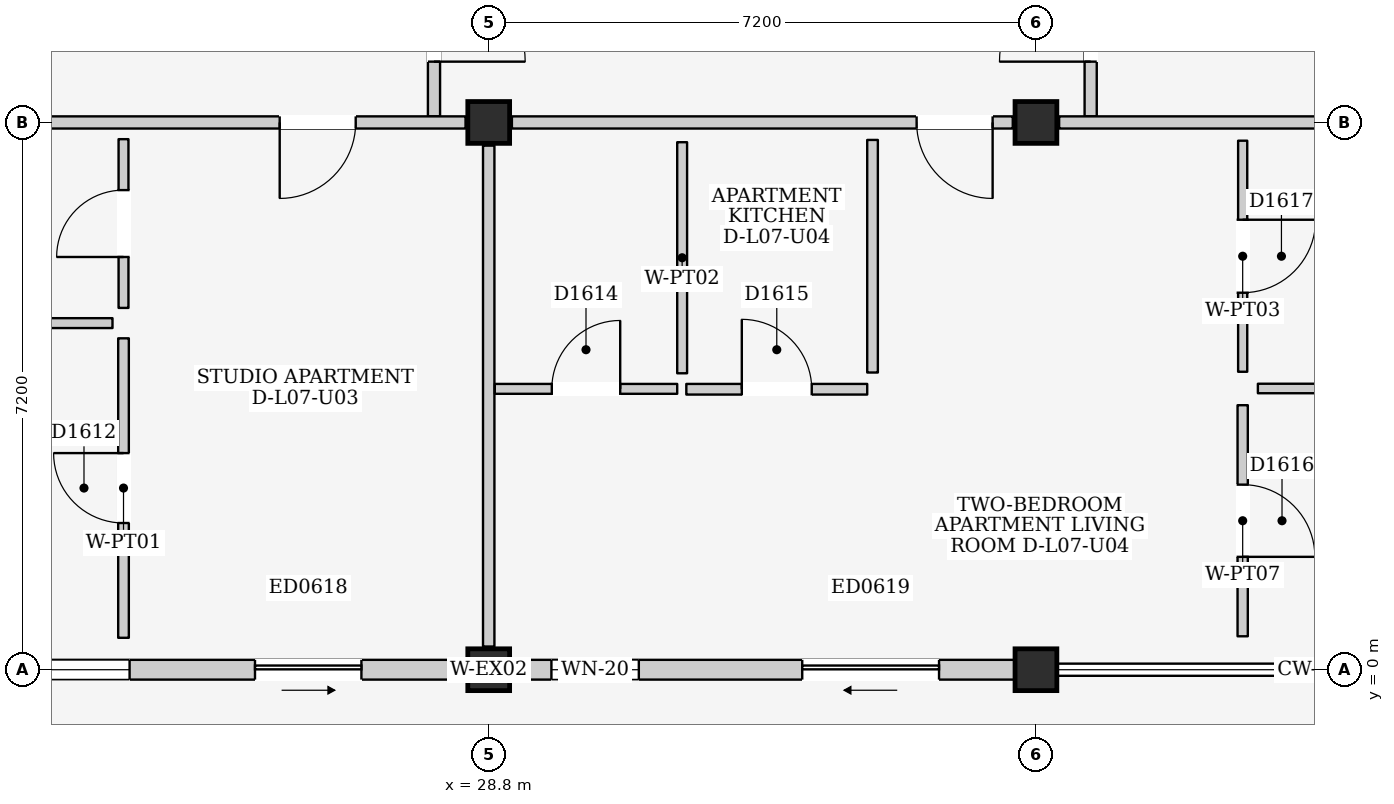
"""IFC4 building model, lengths in metres.
Left out: names, types, materials, properties, quantities, classifications, styles, units other than length and angle.
Written with IfcOpenShell. Run it as: python <this file> out.ifc"""

import sys

from ifc_helpers import new_model, si_unit, direction, frame, frame_2d, origin, origin_2d, place, context, subcontext, project, spatial, rectangle, extrude, element, fill, save


model = new_model("IFC4")
c1 = context("Model", 3, precision=1e-05, world=origin(), true_north=direction((0.0, 1.0)))
c2 = subcontext(c1, "Body", "Model", "MODEL_VIEW")
j1 = project(units=[si_unit("LENGTHUNIT", "METRE"), si_unit("PLANEANGLEUNIT", "RADIAN")], contexts=[c1])
p1 = place(None, origin())
s1 = spatial("IfcSite", under=j1, at=p1, CompositionType="ELEMENT")
p2 = place(p1, origin())
s2 = spatial("IfcBuilding", under=s1, at=p2, CompositionType="ELEMENT")
p3 = place(p2, frame((0.0, 0.0, 25.1)))
s3 = spatial("IfcBuildingStorey", under=s2, at=p3, CompositionType="ELEMENT", Elevation=25.1)
for number, where, z_axis, x_axis in (
    (1, (28.8, 0.0, 0.0), (0.0, 0.0, 1.0), (1.0, 0.0, 0.0)),
    (2, (28.8, 7.2, 0.0), (0.0, 0.0, 1.0), (1.0, 0.0, 0.0)),
    (3, (36.0, 0.0, 0.0), (0.0, 0.0, 1.0), (1.0, 0.0, 0.0)),
    (4, (36.0, 7.2, 0.0), (0.0, 0.0, 1.0), (1.0, 0.0, 0.0)),
):
    element("IfcColumn", number, at=place(p3, frame(where, z_axis=z_axis, x_axis=x_axis)), inside=s3, PredefinedType="COLUMN", context=c2, shape_type="SweptSolid", body=[
        extrude(rectangle(XDim=0.55, YDim=0.55, at=origin_2d()), origin(), (0.0, 0.0, 1.0), 3.2),
    ])
p4 = place(p3, frame((21.875, 0.0, 0.0), z_axis=(0.0, 0.0, 1.0), x_axis=(1.0, 0.0, 0.0)))
e5 = element("IfcWall", 5, at=p4, inside=s3, PredefinedType="ELEMENTEDWALL", context=c2, shape_type="SweptSolid", body=[
    extrude(rectangle(XDim=6.65, YDim=0.26, at=frame_2d((3.325, 0.0))), origin(), (0.0, 0.0, 1.0), 2.525),
])
p5 = place(p4, frame((3.85, 0.0, 0.0)))
e6 = element("IfcOpeningElement", 6, at=p5, cuts=e5, PredefinedType="OPENING", context=c2, shape_type="SweptSolid", body=[
    extrude(rectangle(XDim=1.4, YDim=2.1, at=frame_2d((0.7, 1.05))), frame((0.0, 0.145, 0.0), z_axis=(0.0, -1.0, 0.0), x_axis=(1.0, 0.0, 0.0)), (0.0, 0.0, 1.0), 0.29),
])
p6 = place(p4, frame((0.55, 0.0, 0.9)))
e7 = element("IfcOpeningElement", 7, at=p6, cuts=e5, PredefinedType="OPENING", context=c2, shape_type="SweptSolid", body=[
    extrude(rectangle(XDim=1.65, YDim=1.35, at=frame_2d((0.825, 0.675))), frame((0.0, 0.145, 0.0), z_axis=(0.0, -1.0, 0.0), x_axis=(1.0, 0.0, 0.0)), (0.0, 0.0, 1.0), 0.29),
])
p7 = place(p3, frame((29.075, 0.0, 0.0), z_axis=(0.0, 0.0, 1.0), x_axis=(1.0, 0.0, 0.0)))
e8 = element("IfcWall", 8, at=p7, inside=s3, PredefinedType="ELEMENTEDWALL", context=c2, shape_type="SweptSolid", body=[
    extrude(rectangle(XDim=6.65, YDim=0.26, at=frame_2d((3.325, 0.0))), origin(), (0.0, 0.0, 1.0), 2.525),
])
p8 = place(p7, frame((3.85, 0.0, 0.0)))
e9 = element("IfcOpeningElement", 9, at=p8, cuts=e8, PredefinedType="OPENING", context=c2, shape_type="SweptSolid", body=[
    extrude(rectangle(XDim=1.8, YDim=2.12, at=frame_2d((0.9, 1.06))), frame((0.0, 0.145, 0.0), z_axis=(0.0, -1.0, 0.0), x_axis=(1.0, 0.0, 0.0)), (0.0, 0.0, 1.0), 0.29),
])
p9 = place(p7, frame((0.55, 0.0, 0.9)))
e10 = element("IfcOpeningElement", 10, at=p9, cuts=e8, PredefinedType="OPENING", context=c2, shape_type="SweptSolid", body=[
    extrude(rectangle(XDim=1.15, YDim=1.15, at=frame_2d((0.575, 0.575))), frame((0.0, 0.145, 0.0), z_axis=(0.0, -1.0, 0.0), x_axis=(1.0, 0.0, 0.0)), (0.0, 0.0, 1.0), 0.29),
])
p10 = place(p3, frame((28.08, 7.28, 0.0), z_axis=(0.0, 0.0, 1.0), x_axis=(0.0, 1.0, 0.0)))
e11 = element("IfcWall", 11, at=p10, inside=s3, PredefinedType="PARTITIONING", context=c2, shape_type="SweptSolid", body=[
    extrude(rectangle(XDim=4.32, YDim=0.16, at=frame_2d((2.16, 0.0))), origin(), (0.0, 0.0, 1.0), 2.99),
])
p11 = place(p10, frame((0.72, 0.0, 0.0)))
e12 = element("IfcOpeningElement", 12, at=p11, cuts=e11, PredefinedType="OPENING", context=c2, shape_type="SweptSolid", body=[
    extrude(rectangle(XDim=1.2, YDim=2.2, at=frame_2d((0.6, 1.1))), frame((0.0, 0.095, 0.0), z_axis=(0.0, -1.0, 0.0), x_axis=(1.0, 0.0, 0.0)), (0.0, 0.0, 1.0), 0.19),
])
p12 = place(p3, frame((36.72, 7.28, 0.0), z_axis=(0.0, 0.0, 1.0), x_axis=(0.0, 1.0, 0.0)))
e13 = element("IfcWall", 13, at=p12, inside=s3, PredefinedType="PARTITIONING", context=c2, shape_type="SweptSolid", body=[
    extrude(rectangle(XDim=4.32, YDim=0.16, at=frame_2d((2.16, 0.0))), origin(), (0.0, 0.0, 1.0), 2.99),
])
p13 = place(p12, frame((0.72, 0.0, 0.0)))
e14 = element("IfcOpeningElement", 14, at=p13, cuts=e13, PredefinedType="OPENING", context=c2, shape_type="SweptSolid", body=[
    extrude(rectangle(XDim=1.2, YDim=2.2, at=frame_2d((0.6, 1.1))), frame((0.0, 0.095, 0.0), z_axis=(0.0, -1.0, 0.0), x_axis=(1.0, 0.0, 0.0)), (0.0, 0.0, 1.0), 0.19),
])
p14 = place(p3, frame((21.905, 7.2, 0.0), z_axis=(0.0, 0.0, 1.0), x_axis=(1.0, 0.0, 0.0)))
e15 = element("IfcWall", 15, at=p14, inside=s3, PredefinedType="PARTITIONING", context=c2, shape_type="SweptSolid", body=[
    extrude(rectangle(XDim=6.59, YDim=0.16, at=frame_2d((3.295, 0.0))), origin(), (0.0, 0.0, 1.0), 2.375),
])
p15 = place(p14, frame((4.145, 0.0, 0.0)))
e16 = element("IfcOpeningElement", 16, at=p15, cuts=e15, PredefinedType="OPENING", context=c2, shape_type="SweptSolid", body=[
    extrude(rectangle(XDim=1.0, YDim=2.15, at=frame_2d((0.5, 1.075))), frame((0.0, 0.095, 0.0), z_axis=(0.0, -1.0, 0.0), x_axis=(1.0, 0.0, 0.0)), (0.0, 0.0, 1.0), 0.19),
])
p16 = place(p3, frame((28.8, 0.305, 0.0), z_axis=(0.0, 0.0, 1.0), x_axis=(0.0, 1.0, 0.0)))
e17 = element("IfcWall", 17, at=p16, inside=s3, PredefinedType="PARTITIONING", context=c2, shape_type="SweptSolid", body=[
    extrude(rectangle(XDim=6.59, YDim=0.15, at=frame_2d((3.295, 0.0))), origin(), (0.0, 0.0, 1.0), 2.475),
])
p17 = place(p3, frame((21.8, 4.56, 0.0), z_axis=(0.0, 0.0, 1.0), x_axis=(1.0, 0.0, 0.0)))
e18 = element("IfcWall", 18, at=p17, inside=s3, PredefinedType="PARTITIONING", context=c2, shape_type="SweptSolid", body=[
    extrude(rectangle(XDim=2.05, YDim=0.13, at=frame_2d((1.025, 0.0))), origin(), (0.0, 0.0, 1.0), 2.99),
])
p18 = place(p3, frame((23.995, 4.76, 0.0), z_axis=(0.0, 0.0, 1.0), x_axis=(0.0, 1.0, 0.0)))
e19 = element("IfcWall", 19, at=p18, inside=s3, PredefinedType="PARTITIONING", context=c2, shape_type="SweptSolid", body=[
    extrude(rectangle(XDim=2.22, YDim=0.13, at=frame_2d((1.11, 0.0))), origin(), (0.0, 0.0, 1.0), 2.99),
])
p19 = place(p18, frame((0.67, 0.0, 0.0)))
e20 = element("IfcOpeningElement", 20, at=p19, cuts=e19, PredefinedType="OPENING", context=c2, shape_type="SweptSolid", body=[
    extrude(rectangle(XDim=0.88, YDim=2.1, at=frame_2d((0.44, 1.05))), frame((0.0, 0.08, 0.0), z_axis=(0.0, -1.0, 0.0), x_axis=(1.0, 0.0, 0.0)), (0.0, 0.0, 1.0), 0.16),
])
p20 = place(p3, frame((23.995, 0.42, 0.0), z_axis=(0.0, 0.0, 1.0), x_axis=(0.0, 1.0, 0.0)))
e21 = element("IfcWall", 21, at=p20, inside=s3, PredefinedType="PARTITIONING", context=c2, shape_type="SweptSolid", body=[
    extrude(rectangle(XDim=3.94, YDim=0.14, at=frame_2d((1.97, 0.0))), origin(), (0.0, 0.0, 1.0), 2.99),
])
p21 = place(p20, frame((1.51, 0.0, 0.0)))
e22 = element("IfcOpeningElement", 22, at=p21, cuts=e21, PredefinedType="OPENING", context=c2, shape_type="SweptSolid", body=[
    extrude(rectangle(XDim=0.92, YDim=2.1, at=frame_2d((0.46, 1.05))), frame((0.0, 0.085, 0.0), z_axis=(0.0, -1.0, 0.0), x_axis=(1.0, 0.0, 0.0)), (0.0, 0.0, 1.0), 0.17),
])
p22 = place(p3, frame((29.105, 7.2, 0.0), z_axis=(0.0, 0.0, 1.0), x_axis=(1.0, 0.0, 0.0)))
e23 = element("IfcWall", 23, at=p22, inside=s3, PredefinedType="PARTITIONING", context=c2, shape_type="SweptSolid", body=[
    extrude(rectangle(XDim=6.59, YDim=0.16, at=frame_2d((3.295, 0.0))), origin(), (0.0, 0.0, 1.0), 2.375),
])
p23 = place(p22, frame((5.325, 0.0, 0.0)))
e24 = element("IfcOpeningElement", 24, at=p23, cuts=e23, PredefinedType="OPENING", context=c2, shape_type="SweptSolid", body=[
    extrude(rectangle(XDim=1.0, YDim=2.15, at=frame_2d((0.5, 1.075))), frame((0.0, 0.095, 0.0), z_axis=(0.0, -1.0, 0.0), x_axis=(1.0, 0.0, 0.0)), (0.0, 0.0, 1.0), 0.19),
])
p24 = place(p3, frame((36.305, 7.2, 0.0), z_axis=(0.0, 0.0, 1.0), x_axis=(1.0, 0.0, 0.0)))
e25 = element("IfcWall", 25, at=p24, inside=s3, PredefinedType="PARTITIONING", context=c2, shape_type="SweptSolid", body=[
    extrude(rectangle(XDim=6.59, YDim=0.16, at=frame_2d((3.295, 0.0))), origin(), (0.0, 0.0, 1.0), 2.375),
])
p25 = place(p3, frame((28.88, 3.695, 0.0), z_axis=(0.0, 0.0, 1.0), x_axis=(1.0, 0.0, 0.0)))
e26 = element("IfcWall", 26, at=p25, inside=s3, PredefinedType="PARTITIONING", context=c2, shape_type="SweptSolid", body=[
    extrude(rectangle(XDim=2.4, YDim=0.13, at=frame_2d((1.2, 0.0))), origin(), (0.0, 0.0, 1.0), 2.99),
])
p26 = place(p25, frame((0.75, 0.0, 0.0)))
e27 = element("IfcOpeningElement", 27, at=p26, cuts=e26, PredefinedType="OPENING", context=c2, shape_type="SweptSolid", body=[
    extrude(rectangle(XDim=0.9, YDim=2.1, at=frame_2d((0.45, 1.05))), frame((0.0, 0.08, 0.0), z_axis=(0.0, -1.0, 0.0), x_axis=(1.0, 0.0, 0.0)), (0.0, 0.0, 1.0), 0.16),
])
p27 = place(p3, frame((31.345, 3.9, 0.0), z_axis=(0.0, 0.0, 1.0), x_axis=(0.0, 1.0, 0.0)))
e28 = element("IfcWall", 28, at=p27, inside=s3, PredefinedType="PARTITIONING", context=c2, shape_type="SweptSolid", body=[
    extrude(rectangle(XDim=3.04, YDim=0.13, at=frame_2d((1.52, 0.0))), origin(), (0.0, 0.0, 1.0), 2.99),
])
p28 = place(p3, frame((31.4, 3.69, 0.0), z_axis=(0.0, 0.0, 1.0), x_axis=(1.0, 0.0, 0.0)))
e29 = element("IfcWall", 29, at=p28, inside=s3, PredefinedType="PARTITIONING", context=c2, shape_type="SweptSolid", body=[
    extrude(rectangle(XDim=2.38, YDim=0.14, at=frame_2d((1.19, 0.0))), origin(), (0.0, 0.0, 1.0), 2.99),
])
p29 = place(p28, frame((0.73, 0.0, 0.0)))
e30 = element("IfcOpeningElement", 30, at=p29, cuts=e29, PredefinedType="OPENING", context=c2, shape_type="SweptSolid", body=[
    extrude(rectangle(XDim=0.92, YDim=2.1, at=frame_2d((0.46, 1.05))), frame((0.0, 0.085, 0.0), z_axis=(0.0, -1.0, 0.0), x_axis=(1.0, 0.0, 0.0)), (0.0, 0.0, 1.0), 0.17),
])
p30 = place(p3, frame((33.85, 3.91, 0.0), z_axis=(0.0, 0.0, 1.0), x_axis=(0.0, 1.0, 0.0)))
e31 = element("IfcWall", 31, at=p30, inside=s3, PredefinedType="PARTITIONING", context=c2, shape_type="SweptSolid", body=[
    extrude(rectangle(XDim=3.06, YDim=0.14, at=frame_2d((1.53, 0.0))), origin(), (0.0, 0.0, 1.0), 2.99),
])
p31 = place(p3, frame((38.72, 0.44, 0.0), z_axis=(0.0, 0.0, 1.0), x_axis=(0.0, 1.0, 0.0)))
e32 = element("IfcWall", 32, at=p31, inside=s3, PredefinedType="PARTITIONING", context=c2, shape_type="SweptSolid", body=[
    extrude(rectangle(XDim=3.04, YDim=0.135, at=frame_2d((1.52, 0.0))), origin(), (0.0, 0.0, 1.0), 2.99),
])
p32 = place(p31, frame((1.045, 0.0, 0.0)))
e33 = element("IfcOpeningElement", 33, at=p32, cuts=e32, PredefinedType="OPENING", context=c2, shape_type="SweptSolid", body=[
    extrude(rectangle(XDim=0.95, YDim=2.15, at=frame_2d((0.475, 1.075))), frame((0.0, 0.083, 0.0), z_axis=(0.0, -1.0, 0.0), x_axis=(1.0, 0.0, 0.0)), (0.0, 0.0, 1.0), 0.165),
])
p33 = place(p3, frame((38.92, 3.7, 0.0), z_axis=(0.0, 0.0, 1.0), x_axis=(1.0, 0.0, 0.0)))
e34 = element("IfcWall", 34, at=p33, inside=s3, PredefinedType="PARTITIONING", context=c2, shape_type="SweptSolid", body=[
    extrude(rectangle(XDim=4.06, YDim=0.125, at=frame_2d((2.03, 0.0))), origin(), (0.0, 0.0, 1.0), 2.99),
])
p34 = place(p3, frame((38.72, 3.92, 0.0), z_axis=(0.0, 0.0, 1.0), x_axis=(0.0, 1.0, 0.0)))
e35 = element("IfcWall", 35, at=p34, inside=s3, PredefinedType="PARTITIONING", context=c2, shape_type="SweptSolid", body=[
    extrude(rectangle(XDim=3.04, YDim=0.12, at=frame_2d((1.52, 0.0))), origin(), (0.0, 0.0, 1.0), 2.99),
])
p35 = place(p34, frame((1.04, 0.0, 0.0)))
e36 = element("IfcOpeningElement", 36, at=p35, cuts=e35, PredefinedType="OPENING", context=c2, shape_type="SweptSolid", body=[
    extrude(rectangle(XDim=0.96, YDim=2.15, at=frame_2d((0.48, 1.075))), frame((0.0, 0.075, 0.0), z_axis=(0.0, -1.0, 0.0), x_axis=(1.0, 0.0, 0.0)), (0.0, 0.0, 1.0), 0.15),
])
p36 = place(p5, frame((1.4, 0.0, 0.0), z_axis=(0.0, 0.0, 1.0), x_axis=(-1.0, 0.0, 0.0)))
e37 = element("IfcDoor", 37, at=p36, inside=s3, OperationType="SLIDING_TO_RIGHT", PredefinedType="DOOR", context=c2, shape_type="SweptSolid", body=[
    extrude(rectangle(XDim=1.4, YDim=2.1, at=frame_2d((0.7, 1.05))), frame((0.0, 0.025, 0.0), z_axis=(0.0, -1.0, 0.0), x_axis=(1.0, 0.0, 0.0)), (0.0, 0.0, 1.0), 0.05),
])
fill(e6, e37)
p37 = place(p6, origin())
e38 = element("IfcWindow", 38, at=p37, inside=s3, PartitioningType="DOUBLE_PANEL_VERTICAL", PredefinedType="WINDOW", context=c2, shape_type="SweptSolid", body=[
    extrude(rectangle(XDim=1.65, YDim=1.35, at=frame_2d((0.825, 0.675))), frame((0.0, 0.03, 0.0), z_axis=(0.0, -1.0, 0.0), x_axis=(1.0, 0.0, 0.0)), (0.0, 0.0, 1.0), 0.06),
])
fill(e7, e38)
p38 = place(p8, frame((1.8, 0.0, 0.0), z_axis=(0.0, 0.0, 1.0), x_axis=(-1.0, 0.0, 0.0)))
e39 = element("IfcDoor", 39, at=p38, inside=s3, OperationType="SLIDING_TO_LEFT", PredefinedType="DOOR", context=c2, shape_type="SweptSolid", body=[
    extrude(rectangle(XDim=1.8, YDim=2.12, at=frame_2d((0.9, 1.06))), frame((0.0, 0.025, 0.0), z_axis=(0.0, -1.0, 0.0), x_axis=(1.0, 0.0, 0.0)), (0.0, 0.0, 1.0), 0.05),
])
fill(e9, e39)
p39 = place(p9, origin())
e40 = element("IfcWindow", 40, at=p39, inside=s3, PartitioningType="SINGLE_PANEL", PredefinedType="WINDOW", context=c2, shape_type="SweptSolid", body=[
    extrude(rectangle(XDim=1.15, YDim=1.15, at=frame_2d((0.575, 0.575))), frame((0.0, 0.03, 0.0), z_axis=(0.0, -1.0, 0.0), x_axis=(1.0, 0.0, 0.0)), (0.0, 0.0, 1.0), 0.06),
])
fill(e10, e40)
p40 = place(p11, frame((1.2, 0.0, 0.0), z_axis=(0.0, 0.0, 1.0), x_axis=(-1.0, 0.0, 0.0)))
e41 = element("IfcDoor", 41, at=p40, inside=s3, OperationType="SINGLE_SWING_RIGHT", PredefinedType="DOOR", context=c2, shape_type="SweptSolid", body=[
    extrude(rectangle(XDim=1.2, YDim=2.2, at=frame_2d((0.6, 1.1))), frame((0.0, 0.025, 0.0), z_axis=(0.0, -1.0, 0.0), x_axis=(1.0, 0.0, 0.0)), (0.0, 0.0, 1.0), 0.05),
])
fill(e12, e41)
p41 = place(p13, origin())
e42 = element("IfcDoor", 42, at=p41, inside=s3, OperationType="SINGLE_SWING_LEFT", PredefinedType="DOOR", context=c2, shape_type="SweptSolid", body=[
    extrude(rectangle(XDim=1.2, YDim=2.2, at=frame_2d((0.6, 1.1))), frame((0.0, 0.025, 0.0), z_axis=(0.0, -1.0, 0.0), x_axis=(1.0, 0.0, 0.0)), (0.0, 0.0, 1.0), 0.05),
])
fill(e14, e42)
p42 = place(p15, frame((1.0, 0.0, 0.0), z_axis=(0.0, 0.0, 1.0), x_axis=(-1.0, 0.0, 0.0)))
e43 = element("IfcDoor", 43, at=p42, inside=s3, OperationType="SINGLE_SWING_RIGHT", PredefinedType="DOOR", context=c2, shape_type="SweptSolid", body=[
    extrude(rectangle(XDim=1.0, YDim=2.15, at=frame_2d((0.5, 1.075))), frame((0.0, 0.025, 0.0), z_axis=(0.0, -1.0, 0.0), x_axis=(1.0, 0.0, 0.0)), (0.0, 0.0, 1.0), 0.05),
])
fill(e16, e43)
p43 = place(p19, origin())
e44 = element("IfcDoor", 44, at=p43, inside=s3, OperationType="SINGLE_SWING_LEFT", PredefinedType="DOOR", context=c2, shape_type="SweptSolid", body=[
    extrude(rectangle(XDim=0.88, YDim=2.1, at=frame_2d((0.44, 1.05))), frame((0.0, 0.025, 0.0), z_axis=(0.0, -1.0, 0.0), x_axis=(1.0, 0.0, 0.0)), (0.0, 0.0, 1.0), 0.05),
])
fill(e20, e44)
p44 = place(p21, origin())
e45 = element("IfcDoor", 45, at=p44, inside=s3, OperationType="SINGLE_SWING_RIGHT", PredefinedType="DOOR", context=c2, shape_type="SweptSolid", body=[
    extrude(rectangle(XDim=0.92, YDim=2.1, at=frame_2d((0.46, 1.05))), frame((0.0, 0.025, 0.0), z_axis=(0.0, -1.0, 0.0), x_axis=(1.0, 0.0, 0.0)), (0.0, 0.0, 1.0), 0.05),
])
fill(e22, e45)
p45 = place(p23, frame((1.0, 0.0, 0.0), z_axis=(0.0, 0.0, 1.0), x_axis=(-1.0, 0.0, 0.0)))
e46 = element("IfcDoor", 46, at=p45, inside=s3, OperationType="SINGLE_SWING_LEFT", PredefinedType="DOOR", context=c2, shape_type="SweptSolid", body=[
    extrude(rectangle(XDim=1.0, YDim=2.15, at=frame_2d((0.5, 1.075))), frame((0.0, 0.025, 0.0), z_axis=(0.0, -1.0, 0.0), x_axis=(1.0, 0.0, 0.0)), (0.0, 0.0, 1.0), 0.05),
])
fill(e24, e46)
p46 = place(p26, origin())
e47 = element("IfcDoor", 47, at=p46, inside=s3, OperationType="SINGLE_SWING_RIGHT", PredefinedType="DOOR", context=c2, shape_type="SweptSolid", body=[
    extrude(rectangle(XDim=0.9, YDim=2.1, at=frame_2d((0.45, 1.05))), frame((0.0, 0.025, 0.0), z_axis=(0.0, -1.0, 0.0), x_axis=(1.0, 0.0, 0.0)), (0.0, 0.0, 1.0), 0.05),
])
fill(e27, e47)
p47 = place(p29, origin())
e48 = element("IfcDoor", 48, at=p47, inside=s3, OperationType="SINGLE_SWING_LEFT", PredefinedType="DOOR", context=c2, shape_type="SweptSolid", body=[
    extrude(rectangle(XDim=0.92, YDim=2.1, at=frame_2d((0.46, 1.05))), frame((0.0, 0.025, 0.0), z_axis=(0.0, -1.0, 0.0), x_axis=(1.0, 0.0, 0.0)), (0.0, 0.0, 1.0), 0.05),
])
fill(e30, e48)
p48 = place(p32, frame((0.95, 0.0, 0.0), z_axis=(0.0, 0.0, 1.0), x_axis=(-1.0, 0.0, 0.0)))
e49 = element("IfcDoor", 49, at=p48, inside=s3, OperationType="SINGLE_SWING_RIGHT", PredefinedType="DOOR", context=c2, shape_type="SweptSolid", body=[
    extrude(rectangle(XDim=0.95, YDim=2.15, at=frame_2d((0.475, 1.075))), frame((0.0, 0.025, 0.0), z_axis=(0.0, -1.0, 0.0), x_axis=(1.0, 0.0, 0.0)), (0.0, 0.0, 1.0), 0.05),
])
fill(e33, e49)
p49 = place(p35, frame((0.96, 0.0, 0.0), z_axis=(0.0, 0.0, 1.0), x_axis=(-1.0, 0.0, 0.0)))
e50 = element("IfcDoor", 50, at=p49, inside=s3, OperationType="SINGLE_SWING_LEFT", PredefinedType="DOOR", context=c2, shape_type="SweptSolid", body=[
    extrude(rectangle(XDim=0.96, YDim=2.15, at=frame_2d((0.48, 1.075))), frame((0.0, 0.025, 0.0), z_axis=(0.0, -1.0, 0.0), x_axis=(1.0, 0.0, 0.0)), (0.0, 0.0, 1.0), 0.05),
])
fill(e36, e50)
save(model, sys.argv[1])
